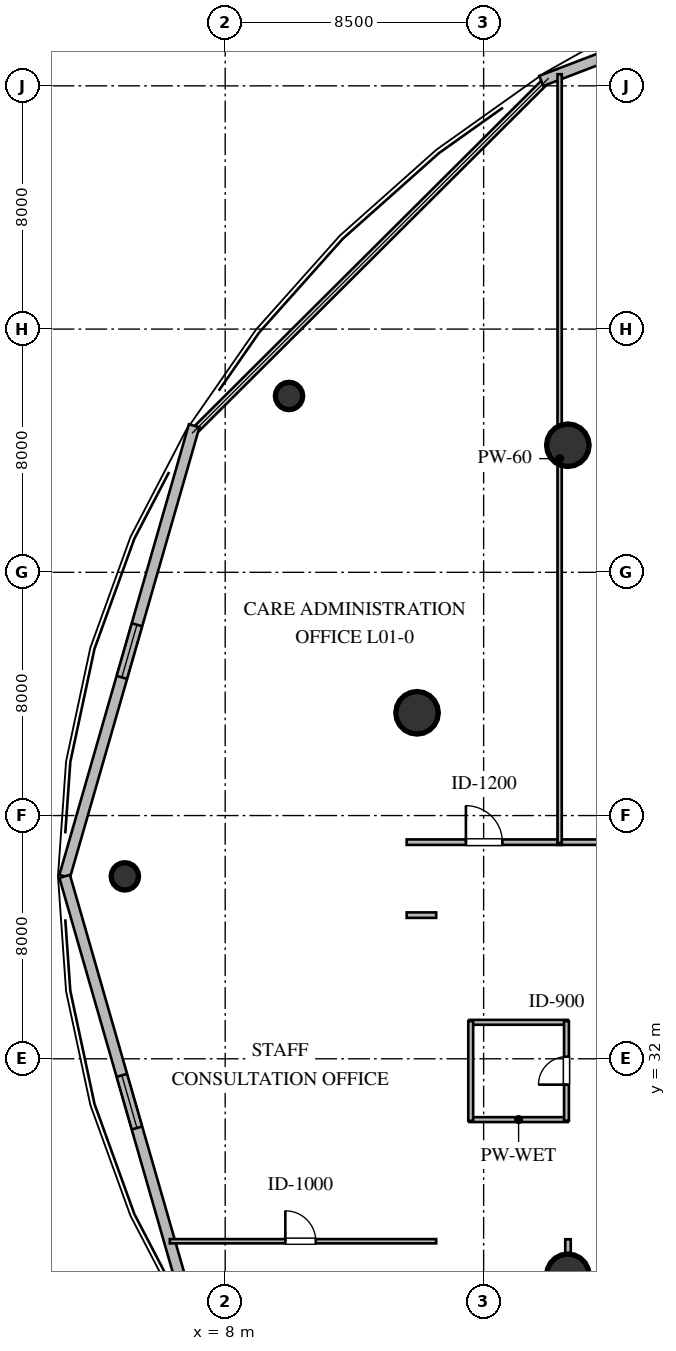
"""IFC4 building model, lengths in metres.
Left out: names, types, materials, properties, quantities, classifications, styles, units other than length and angle.
Written with IfcOpenShell. Run it as: python <this file> out.ifc"""

import sys

from ifc_helpers import new_model, si_unit, direction, frame, frame_2d, origin, origin_2d, place, context, subcontext, project, spatial, rectangle, circle, extrude, element, fill, save


model = new_model("IFC4")
c1 = context("Model", 3, precision=1e-05, world=origin(), true_north=direction((0.0, 1.0)))
c2 = subcontext(c1, "Body", "Model", "MODEL_VIEW")
j1 = project(units=[si_unit("LENGTHUNIT", "METRE"), si_unit("PLANEANGLEUNIT", "RADIAN")], contexts=[c1])
p1 = place(None, origin())
s1 = spatial("IfcSite", under=j1, at=p1, CompositionType="ELEMENT")
p2 = place(p1, origin())
s2 = spatial("IfcBuilding", under=s1, at=p2, CompositionType="ELEMENT")
p3 = place(p2, frame((0.0, 0.0, 4.8)))
s3 = spatial("IfcBuildingStorey", under=s2, at=p3, CompositionType="ELEMENT", Elevation=4.8)
for number, where, z_axis, x_axis in (
    (1, (19.27, 52.18, 0.0), (0.0, 0.0, 1.0), (1.0, 0.0, 0.0)),
    (2, (14.31, 43.38, 0.0), (0.0, 0.0, 1.0), (1.0, 0.0, 0.0)),
    (3, (19.27, 24.88, 0.0), (0.0, 0.0, 1.0), (1.0, 0.0, 0.0)),
):
    element("IfcColumn", number, at=place(p3, frame(where, z_axis=z_axis, x_axis=x_axis)), inside=s3, PredefinedType="COLUMN", context=c2, shape_type="SweptSolid", body=[
        extrude(circle(Radius=0.7, at=origin_2d()), origin(), (0.0, 0.0, 1.0), 4.8),
    ])
for number, where, z_axis, x_axis in (
    (4, (10.1, 53.8, 0.0), (0.0, 0.0, 1.0), (1.0, 0.0, 0.0)),
    (5, (4.7, 38.0, 0.0), (0.0, 0.0, 1.0), (1.0, 0.0, 0.0)),
):
    element("IfcColumn", number, at=place(p3, frame(where, z_axis=z_axis, x_axis=x_axis)), inside=s3, PredefinedType="COLUMN", context=c2, shape_type="SweptSolid", body=[
        extrude(circle(Radius=0.45, at=origin_2d()), origin(), (0.0, 0.0, 1.0), 4.8),
    ])
p4 = place(p3, frame((35.835, 70.831, 0.0), z_axis=(0.0, 0.0, 1.0), x_axis=(-0.934010262022, -0.357246176238, 0.0)))
e6 = element("IfcWall", 6, at=p4, inside=s3, PredefinedType="STANDARD", context=c2, shape_type="SweptSolid", body=[
    extrude(rectangle(XDim=18.671, YDim=0.36, at=frame_2d((9.335, 0.0))), origin(), (0.0, 0.0, 1.0), 4.52),
])
p5 = place(p4, frame((8.436, 0.0, 1.05)))
e7 = element("IfcOpeningElement", 7, at=p5, cuts=e6, PredefinedType="OPENING", context=c2, shape_type="SweptSolid", body=[
    extrude(rectangle(XDim=1.8, YDim=1.7, at=frame_2d((0.9, 0.85))), frame((0.0, 0.19, 0.0), z_axis=(0.0, -1.0, 0.0), x_axis=(1.0, 0.0, 0.0)), (0.0, 0.0, 1.0), 0.38),
])
p6 = place(p3, frame((6.979, 52.82, 0.0), z_axis=(0.0, 0.0, 1.0), x_axis=(-0.276203409751, -0.961099202186, 0.0)))
e8 = element("IfcWall", 8, at=p6, inside=s3, PredefinedType="STANDARD", context=c2, shape_type="SweptSolid", body=[
    extrude(rectangle(XDim=15.42, YDim=0.36, at=frame_2d((7.71, 0.0))), origin(), (0.0, 0.0, 1.0), 4.52),
])
p7 = place(p6, frame((6.81, 0.0, 1.05)))
e9 = element("IfcOpeningElement", 9, at=p7, cuts=e8, PredefinedType="OPENING", context=c2, shape_type="SweptSolid", body=[
    extrude(rectangle(XDim=1.8, YDim=1.7, at=frame_2d((0.9, 0.85))), frame((0.0, 0.19, 0.0), z_axis=(0.0, -1.0, 0.0), x_axis=(1.0, 0.0, 0.0)), (0.0, 0.0, 1.0), 0.38),
])
p8 = place(p3, frame((2.72, 38.0, 0.0), z_axis=(0.0, 0.0, 1.0), x_axis=(0.276203409751, -0.961099202186, 0.0)))
e10 = element("IfcWall", 10, at=p8, inside=s3, PredefinedType="STANDARD", context=c2, shape_type="SweptSolid", body=[
    extrude(rectangle(XDim=15.42, YDim=0.36, at=frame_2d((7.71, 0.0))), origin(), (0.0, 0.0, 1.0), 4.52),
])
p9 = place(p8, frame((6.81, 0.0, 1.05)))
e11 = element("IfcOpeningElement", 11, at=p9, cuts=e10, PredefinedType="OPENING", context=c2, shape_type="SweptSolid", body=[
    extrude(rectangle(XDim=1.8, YDim=1.7, at=frame_2d((0.9, 0.85))), frame((0.0, 0.19, 0.0), z_axis=(0.0, -1.0, 0.0), x_axis=(1.0, 0.0, 0.0)), (0.0, 0.0, 1.0), 0.38),
])
for number, where, z_axis, x_axis in (
    (12, (16.035, 30.0, 0.0), (0.0, 0.0, 1.0), (1.0, 0.0, 0.0)),
    (13, (16.035, 33.2, 0.0), (0.0, 0.0, 1.0), (1.0, 0.0, 0.0)),
):
    element("IfcWall", number, at=place(p3, frame(where, z_axis=z_axis, x_axis=x_axis)), inside=s3, PredefinedType="PLUMBINGWALL", context=c2, shape_type="SweptSolid", body=[
        extrude(rectangle(XDim=3.23, YDim=0.16, at=frame_2d((1.615, 0.0))), origin(), (0.0, 0.0, 1.0), 4.52),
    ])
p10 = place(p3, frame((16.075, 29.96, 0.0), z_axis=(0.0, 0.0, 1.0), x_axis=(0.0, 1.0, 0.0)))
e14 = element("IfcWall", 14, at=p10, inside=s3, PredefinedType="PLUMBINGWALL", context=c2, shape_type="SweptSolid", body=[
    extrude(rectangle(XDim=3.28, YDim=0.16, at=frame_2d((1.64, 0.0))), origin(), (0.0, 0.0, 1.0), 4.52),
])
p11 = place(p3, frame((19.225, 29.96, 0.0), z_axis=(0.0, 0.0, 1.0), x_axis=(0.0, 1.0, 0.0)))
e15 = element("IfcWall", 15, at=p11, inside=s3, PredefinedType="PLUMBINGWALL", context=c2, shape_type="SweptSolid", body=[
    extrude(rectangle(XDim=3.28, YDim=0.16, at=frame_2d((1.64, 0.0))), origin(), (0.0, 0.0, 1.0), 4.52),
])
p12 = place(p11, frame((1.19, 0.0, 0.0)))
e16 = element("IfcOpeningElement", 16, at=p12, cuts=e15, PredefinedType="OPENING", context=c2, shape_type="SweptSolid", body=[
    extrude(rectangle(XDim=0.92, YDim=2.1, at=frame_2d((0.46, 1.05))), frame((0.0, 0.09, 0.0), z_axis=(0.0, -1.0, 0.0), x_axis=(1.0, 0.0, 0.0)), (0.0, 0.0, 1.0), 0.18),
])
p13 = place(p3, frame((13.97, 39.125, 0.0), z_axis=(0.0, 0.0, 1.0), x_axis=(1.0, 0.0, 0.0)))
e17 = element("IfcWall", 17, at=p13, inside=s3, PredefinedType="PARTITIONING", context=c2, shape_type="SweptSolid", body=[
    extrude(rectangle(XDim=5.095, YDim=0.18, at=frame_2d((2.547, 0.0))), origin(), (0.0, 0.0, 1.0), 4.52),
])
p14 = place(p13, frame((1.947, 0.0, 0.0)))
e18 = element("IfcOpeningElement", 18, at=p14, cuts=e17, PredefinedType="OPENING", context=c2, shape_type="SweptSolid", body=[
    extrude(rectangle(XDim=1.2, YDim=2.15, at=frame_2d((0.6, 1.075))), frame((0.0, 0.1, 0.0), z_axis=(0.0, -1.0, 0.0), x_axis=(1.0, 0.0, 0.0)), (0.0, 0.0, 1.0), 0.2),
])
p15 = place(p3, frame((18.935, 39.125, 0.0), z_axis=(0.0, 0.0, 1.0), x_axis=(1.0, 0.0, 0.0)))
e19 = element("IfcWall", 19, at=p15, inside=s3, PredefinedType="PARTITIONING", context=c2, shape_type="SweptSolid", body=[
    extrude(rectangle(XDim=12.33, YDim=0.18, at=frame_2d((6.165, 0.0))), origin(), (0.0, 0.0, 1.0), 4.52),
])
p16 = place(p15, frame((5.565, 0.0, 0.0)))
e20 = element("IfcOpeningElement", 20, at=p16, cuts=e19, PredefinedType="OPENING", context=c2, shape_type="SweptSolid", body=[
    extrude(rectangle(XDim=1.2, YDim=2.15, at=frame_2d((0.6, 1.075))), frame((0.0, 0.1, 0.0), z_axis=(0.0, -1.0, 0.0), x_axis=(1.0, 0.0, 0.0)), (0.0, 0.0, 1.0), 0.2),
])
p17 = place(p3, frame((19.275, 19.97, 0.0), z_axis=(0.0, 0.0, 1.0), x_axis=(0.0, 1.0, 0.0)))
e21 = element("IfcWall", 21, at=p17, inside=s3, PredefinedType="PARTITIONING", context=c2, shape_type="SweptSolid", body=[
    extrude(rectangle(XDim=6.095, YDim=0.18, at=frame_2d((3.047, 0.0))), origin(), (0.0, 0.0, 1.0), 3.898),
])
p18 = place(p17, frame((1.647, 0.0, 0.0)))
e22 = element("IfcOpeningElement", 22, at=p18, cuts=e21, PredefinedType="OPENING", context=c2, shape_type="SweptSolid", body=[
    extrude(rectangle(XDim=1.2, YDim=2.15, at=frame_2d((0.6, 1.075))), frame((0.0, 0.1, 0.0), z_axis=(0.0, -1.0, 0.0), x_axis=(1.0, 0.0, 0.0)), (0.0, 0.0, 1.0), 0.2),
])
p19 = place(p3, frame((14.94, 36.725, 0.0), z_axis=(0.0, 0.0, 1.0), x_axis=(-1.0, 0.0, 0.0)))
e23 = element("IfcWall", 23, at=p19, inside=s3, PredefinedType="PARTITIONING", context=c2, shape_type="SweptSolid", body=[
    extrude(rectangle(XDim=0.97, YDim=0.18, at=frame_2d((0.485, 0.0))), origin(), (0.0, 0.0, 1.0), 4.52),
])
p20 = place(p3, frame((19.0, 64.382, 0.0), z_axis=(0.0, 0.0, 1.0), x_axis=(0.0, -1.0, 0.0)))
e24 = element("IfcWall", 24, at=p20, inside=s3, PredefinedType="PARTITIONING", context=c2, shape_type="SweptSolid", body=[
    extrude(rectangle(XDim=25.287, YDim=0.14, at=frame_2d((12.644, 0.0))), origin(), (0.0, 0.0, 1.0), 4.05),
])
p21 = place(p3, frame((6.179, 26.0, 0.0), z_axis=(0.0, 0.0, 1.0), x_axis=(1.0, 0.0, 0.0)))
e25 = element("IfcWall", 25, at=p21, inside=s3, PredefinedType="PARTITIONING", context=c2, shape_type="SweptSolid", body=[
    extrude(rectangle(XDim=8.761, YDim=0.14, at=frame_2d((4.381, 0.0))), origin(), (0.0, 0.0, 1.0), 4.52),
])
p22 = place(p21, frame((3.8, 0.0, 0.0)))
e26 = element("IfcOpeningElement", 26, at=p22, cuts=e25, PredefinedType="OPENING", context=c2, shape_type="SweptSolid", body=[
    extrude(rectangle(XDim=1.0, YDim=2.1, at=frame_2d((0.5, 1.05))), frame((0.0, 0.08, 0.0), z_axis=(0.0, -1.0, 0.0), x_axis=(1.0, 0.0, 0.0)), (0.0, 0.0, 1.0), 0.16),
])
p23 = place(p7, origin())
e27 = element("IfcWindow", 27, at=p23, inside=s3, PartitioningType="SINGLE_PANEL", PredefinedType="WINDOW", context=c2, shape_type="SweptSolid", body=[
    extrude(rectangle(XDim=1.8, YDim=1.7, at=frame_2d((0.9, 0.85))), frame((0.0, 0.03, 0.0), z_axis=(0.0, -1.0, 0.0), x_axis=(1.0, 0.0, 0.0)), (0.0, 0.0, 1.0), 0.06),
])
fill(e9, e27)
p24 = place(p9, origin())
e28 = element("IfcWindow", 28, at=p24, inside=s3, PartitioningType="SINGLE_PANEL", PredefinedType="WINDOW", context=c2, shape_type="SweptSolid", body=[
    extrude(rectangle(XDim=1.8, YDim=1.7, at=frame_2d((0.9, 0.85))), frame((0.0, 0.03, 0.0), z_axis=(0.0, -1.0, 0.0), x_axis=(1.0, 0.0, 0.0)), (0.0, 0.0, 1.0), 0.06),
])
fill(e11, e28)
p25 = place(p12, origin())
e29 = element("IfcDoor", 29, at=p25, inside=s3, OperationType="SINGLE_SWING_LEFT", PredefinedType="DOOR", context=c2, shape_type="SweptSolid", body=[
    extrude(rectangle(XDim=0.92, YDim=2.1, at=frame_2d((0.46, 1.05))), frame((0.0, 0.025, 0.0), z_axis=(0.0, -1.0, 0.0), x_axis=(1.0, 0.0, 0.0)), (0.0, 0.0, 1.0), 0.05),
])
fill(e16, e29)
p26 = place(p14, origin())
e30 = element("IfcDoor", 30, at=p26, inside=s3, OperationType="SINGLE_SWING_LEFT", PredefinedType="DOOR", context=c2, shape_type="SweptSolid", body=[
    extrude(rectangle(XDim=1.2, YDim=2.15, at=frame_2d((0.6, 1.075))), frame((0.0, 0.025, 0.0), z_axis=(0.0, -1.0, 0.0), x_axis=(1.0, 0.0, 0.0)), (0.0, 0.0, 1.0), 0.05),
])
fill(e18, e30)
p27 = place(p22, origin())
e31 = element("IfcDoor", 31, at=p27, inside=s3, OperationType="SINGLE_SWING_LEFT", PredefinedType="DOOR", context=c2, shape_type="SweptSolid", body=[
    extrude(rectangle(XDim=1.0, YDim=2.1, at=frame_2d((0.5, 1.05))), frame((0.0, 0.025, 0.0), z_axis=(0.0, -1.0, 0.0), x_axis=(1.0, 0.0, 0.0)), (0.0, 0.0, 1.0), 0.05),
])
fill(e26, e31)
save(model, sys.argv[1])
